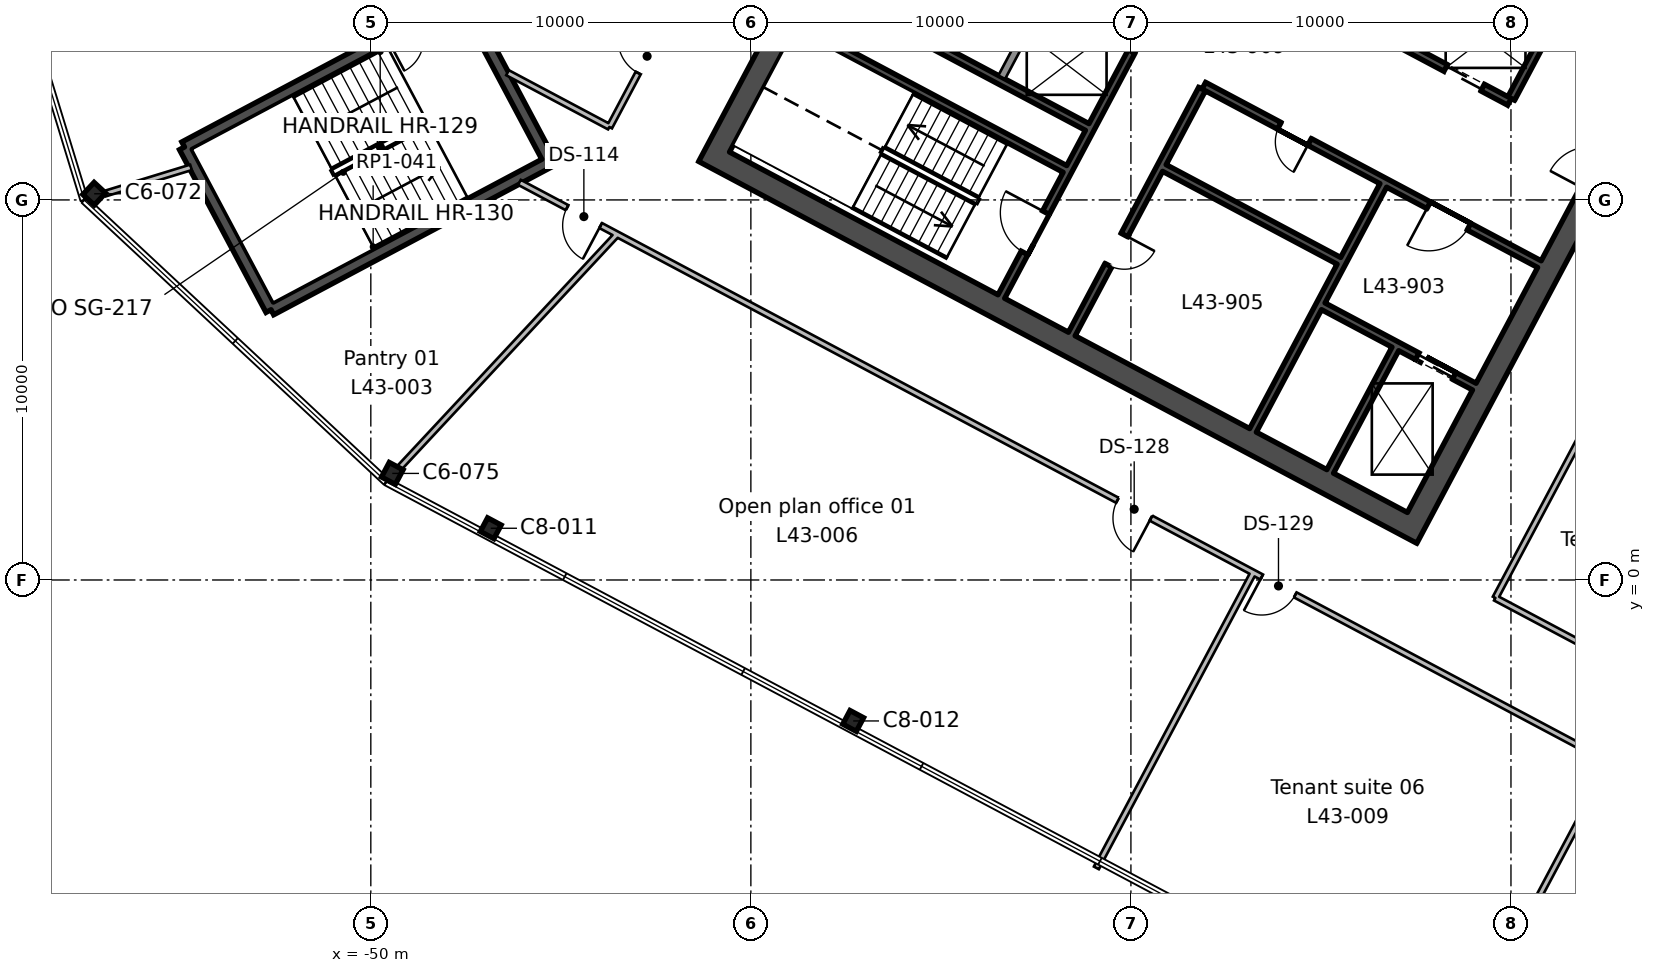
"""IFC4 building model, lengths in metres.
Left out: names, types, materials, properties, quantities, classifications, styles, units other than length and angle.
Written with IfcOpenShell. Run it as: python <this file> out.ifc"""

import sys

from ifc_helpers import new_model, si_unit, direction, frame, frame_2d, origin, origin_2d, place, context, subcontext, project, spatial, rectangle, i_section, extrude, element, fill, save


model = new_model("IFC4")
c1 = context("Model", 3, precision=1e-05, world=origin(), true_north=direction((0.0, 1.0)))
c2 = subcontext(c1, "Body", "Model", "MODEL_VIEW")
j1 = project(units=[si_unit("LENGTHUNIT", "METRE"), si_unit("PLANEANGLEUNIT", "RADIAN")], contexts=[c1])
p1 = place(None, origin())
s1 = spatial("IfcSite", under=j1, at=p1, CompositionType="ELEMENT")
p2 = place(p1, origin())
s2 = spatial("IfcBuilding", under=s1, at=p2, CompositionType="ELEMENT")
p3 = place(p2, frame((0.0, 0.0, 201.3)))
s3 = spatial("IfcBuildingStorey", under=s2, at=p3, CompositionType="ELEMENT", Elevation=201.3)
for number, where, z_axis, x_axis in (
    (1, (-37.308, -3.709, 0.0), (0.0, 0.0, 1.0), (0.883, -0.469, 0.0)),
    (2, (-46.844, 1.361, 0.0), (0.0, 0.0, 1.0), (0.883, -0.469, 0.0)),
):
    element("IfcColumn", number, at=place(p3, frame(where, z_axis=z_axis, x_axis=x_axis)), inside=s3, PredefinedType="COLUMN", context=c2, shape_type="SweptSolid", body=[
        extrude(i_section(OverallWidth=0.404, OverallDepth=0.406, WebThickness=0.027, FlangeThickness=0.044, FilletRadius=0.015, at=origin_2d()), origin(), (0.0, 0.0, 1.0), 3.9),
    ])
for number, where, z_axis, x_axis in (
    (3, (-49.435, 2.804, 0.0), (0.0, 0.0, 1.0), (0.883, -0.469, 0.0)),
    (4, (-57.279, 10.162, 0.0), (0.0, 0.0, 1.0), (0.731, -0.682, 0.0)),
):
    element("IfcColumn", number, at=place(p3, frame(where, z_axis=z_axis, x_axis=x_axis)), inside=s3, PredefinedType="COLUMN", context=c2, shape_type="SweptSolid", body=[
        extrude(i_section(OverallWidth=0.412, OverallDepth=0.434, WebThickness=0.036, FlangeThickness=0.057, FilletRadius=0.015, at=origin_2d()), origin(), (0.0, 0.0, 1.0), 3.9),
    ])
p4 = place(p3, frame((-13.635, 18.236, 0.0), z_axis=(0.0, 0.0, 1.0), x_axis=(-0.469478769487, -0.88294376095, 0.0)))
e5 = element("IfcWall", 5, at=p4, inside=s3, PredefinedType="SHEAR", context=c2, shape_type="SweptSolid", body=[
    extrude(rectangle(XDim=19.4, YDim=0.6, at=frame_2d((9.7, 0.0))), origin(), (0.0, 0.0, 1.0), 3.9),
])
p5 = place(p4, frame((6.7, 0.0, 0.0)))
e6 = element("IfcOpeningElement", 6, at=p5, cuts=e5, PredefinedType="OPENING", context=c2, shape_type="SweptSolid", body=[
    extrude(rectangle(XDim=2.4, YDim=2.4, at=frame_2d((1.2, 1.2))), frame((0.0, 0.31, 0.0), z_axis=(0.0, -1.0, 0.0), x_axis=(1.0, 0.0, 0.0)), (0.0, 0.0, 1.0), 0.62),
])
p6 = place(p3, frame((-32.0, 28.001, 0.0), z_axis=(0.0, 0.0, 1.0), x_axis=(-0.469468958625, -0.882948977511, 0.0)))
e7 = element("IfcWall", 7, at=p6, inside=s3, PredefinedType="SHEAR", context=c2, shape_type="SweptSolid", body=[
    extrude(rectangle(XDim=19.4, YDim=0.6, at=frame_2d((9.7, 0.0))), origin(), (0.0, 0.0, 1.0), 3.9),
])
p7 = place(p6, frame((10.3, 0.0, 0.0)))
e8 = element("IfcOpeningElement", 8, at=p7, cuts=e7, PredefinedType="OPENING", context=c2, shape_type="SweptSolid", body=[
    extrude(rectangle(XDim=2.4, YDim=2.4, at=frame_2d((1.2, 1.2))), frame((0.0, 0.31, 0.0), z_axis=(0.0, -1.0, 0.0), x_axis=(1.0, 0.0, 0.0)), (0.0, 0.0, 1.0), 0.62),
])
p8 = place(p3, frame((-22.867, 1.512, 0.0), z_axis=(0.0, 0.0, 1.0), x_axis=(-0.88294509198, 0.469476266226, 0.0)))
e9 = element("IfcWall", 9, at=p8, inside=s3, PredefinedType="SHEAR", context=c2, shape_type="SweptSolid", body=[
    extrude(rectangle(XDim=20.2, YDim=0.6, at=frame_2d((10.1, 0.0))), origin(), (0.0, 0.0, 1.0), 3.9),
])
p9 = place(p3, frame((-23.043, 6.08, 0.0), z_axis=(0.0, 0.0, 1.0), x_axis=(-0.469494272526, -0.882935517501, 0.0)))
e10 = element("IfcWall", 10, at=p9, inside=s3, PredefinedType="SHEAR", context=c2, shape_type="SweptSolid", body=[
    extrude(rectangle(XDim=3.65, YDim=0.2, at=frame_2d((1.825, 0.0))), origin(), (0.0, 0.0, 1.0), 3.9),
])
p10 = place(p3, frame((-18.96, 14.611, 0.0), z_axis=(0.0, 0.0, 1.0), x_axis=(-0.4694473164, -0.882960484464, 0.0)))
e11 = element("IfcWall", 11, at=p10, inside=s3, PredefinedType="SHEAR", context=c2, shape_type="SweptSolid", body=[
    extrude(rectangle(XDim=2.2, YDim=0.2, at=frame_2d((1.1, 0.0))), origin(), (0.0, 0.0, 1.0), 3.9),
])
p11 = place(p3, frame((-23.36, 10.382, 0.0), z_axis=(0.0, 0.0, 1.0), x_axis=(-0.469480409012, -0.88294288918, 0.0)))
e12 = element("IfcWall", 12, at=p11, inside=s3, PredefinedType="SHEAR", context=c2, shape_type="SweptSolid", body=[
    extrude(rectangle(XDim=7.3, YDim=0.2, at=frame_2d((3.65, 0.0))), origin(), (0.0, 0.0, 1.0), 3.9),
])
p12 = place(p3, frame((-28.128, 12.917, 0.0), z_axis=(0.0, 0.0, 1.0), x_axis=(-0.469454336211, -0.882956752176, 0.0)))
e13 = element("IfcWall", 13, at=p12, inside=s3, PredefinedType="SHEAR", context=c2, shape_type="SweptSolid", body=[
    extrude(rectangle(XDim=7.3, YDim=0.2, at=frame_2d((3.65, 0.0))), origin(), (0.0, 0.0, 1.0), 3.9),
])
p13 = place(p12, frame((4.35, 0.0, 0.0)))
e14 = element("IfcOpeningElement", 14, at=p13, cuts=e13, PredefinedType="OPENING", context=c2, shape_type="SweptSolid", body=[
    extrude(rectangle(XDim=0.9, YDim=2.1, at=frame_2d((0.45, 1.05))), frame((0.0, 0.11, 0.0), z_axis=(0.0, -1.0, 0.0), x_axis=(1.0, 0.0, 0.0)), (0.0, 0.0, 1.0), 0.22),
])
p14 = place(p3, frame((-29.982, 13.903, 0.0), z_axis=(0.0, 0.0, 1.0), x_axis=(-0.469454336211, -0.882956752176, 0.0)))
e15 = element("IfcWall", 15, at=p14, inside=s3, PredefinedType="SHEAR", context=c2, shape_type="SweptSolid", body=[
    extrude(rectangle(XDim=7.3, YDim=0.2, at=frame_2d((3.65, 0.0))), origin(), (0.0, 0.0, 1.0), 3.9),
])
p15 = place(p14, frame((4.8, 0.0, 0.0)))
e16 = element("IfcOpeningElement", 16, at=p15, cuts=e15, PredefinedType="OPENING", context=c2, shape_type="SweptSolid", body=[
    extrude(rectangle(XDim=1.2, YDim=2.1, at=frame_2d((0.6, 1.05))), frame((0.0, 0.11, 0.0), z_axis=(0.0, -1.0, 0.0), x_axis=(1.0, 0.0, 0.0)), (0.0, 0.0, 1.0), 0.22),
])
p16 = place(p3, frame((-32.366, 15.171, 0.0), z_axis=(0.0, 0.0, 1.0), x_axis=(-0.469487830541, -0.882938942948, 0.0)))
e17 = element("IfcWall", 17, at=p16, inside=s3, PredefinedType="SOLIDWALL", context=c2, shape_type="SweptSolid", body=[
    extrude(rectangle(XDim=2.2, YDim=0.2, at=frame_2d((1.1, 0.0))), origin(), (0.0, 0.0, 1.0), 3.9),
])
p17 = place(p3, frame((-16.529, 13.432, 0.0), z_axis=(0.0, 0.0, 1.0), x_axis=(-0.88295287151, 0.469461634952, 0.0)))
e18 = element("IfcWall", 18, at=p17, inside=s3, PredefinedType="SHEAR", context=c2, shape_type="SweptSolid", body=[
    extrude(rectangle(XDim=8.0, YDim=0.2, at=frame_2d((4.0, 0.0))), origin(), (0.0, 0.0, 1.0), 3.9),
])
p18 = place(p3, frame((-20.04, 12.581, 0.0), z_axis=(0.0, 0.0, 1.0), x_axis=(-0.882942972946, 0.469480251476, 0.0)))
e19 = element("IfcWall", 19, at=p18, inside=s3, PredefinedType="SHEAR", context=c2, shape_type="SweptSolid", body=[
    extrude(rectangle(XDim=5.4, YDim=0.2, at=frame_2d((2.7, 0.0))), origin(), (0.0, 0.0, 1.0), 3.9),
])
p19 = place(p18, frame((0.8, 0.0, 0.0)))
e20 = element("IfcOpeningElement", 20, at=p19, cuts=e19, PredefinedType="OPENING", context=c2, shape_type="SweptSolid", body=[
    extrude(rectangle(XDim=1.1, YDim=2.1, at=frame_2d((0.55, 1.05))), frame((0.0, 0.11, 0.0), z_axis=(0.0, -1.0, 0.0), x_axis=(1.0, 0.0, 0.0)), (0.0, 0.0, 1.0), 0.22),
])
p20 = place(p18, frame((3.5, 0.0, 0.0)))
e21 = element("IfcOpeningElement", 21, at=p20, cuts=e19, PredefinedType="OPENING", context=c2, shape_type="SweptSolid", body=[
    extrude(rectangle(XDim=1.1, YDim=2.1, at=frame_2d((0.55, 1.05))), frame((0.0, 0.11, 0.0), z_axis=(0.0, -1.0, 0.0), x_axis=(1.0, 0.0, 0.0)), (0.0, 0.0, 1.0), 0.22),
])
p21 = place(p3, frame((-19.252, 8.311, 0.0), z_axis=(0.0, 0.0, 1.0), x_axis=(-0.882955722218, 0.469456273365, 0.0)))
e22 = element("IfcWall", 22, at=p21, inside=s3, PredefinedType="SHEAR", context=c2, shape_type="SweptSolid", body=[
    extrude(rectangle(XDim=10.0, YDim=0.2, at=frame_2d((5.0, 0.0))), origin(), (0.0, 0.0, 1.0), 3.9),
])
p22 = place(p21, frame((2.1, 0.0, 0.0)))
e23 = element("IfcOpeningElement", 23, at=p22, cuts=e22, PredefinedType="OPENING", context=c2, shape_type="SweptSolid", body=[
    extrude(rectangle(XDim=1.2, YDim=2.1, at=frame_2d((0.6, 1.05))), frame((0.0, 0.11, 0.0), z_axis=(0.0, -1.0, 0.0), x_axis=(1.0, 0.0, 0.0)), (0.0, 0.0, 1.0), 0.22),
])
p23 = place(p21, frame((6.85, 0.0, 0.0)))
e24 = element("IfcOpeningElement", 24, at=p23, cuts=e22, PredefinedType="OPENING", context=c2, shape_type="SweptSolid", body=[
    extrude(rectangle(XDim=0.9, YDim=2.1, at=frame_2d((0.45, 1.05))), frame((0.0, 0.11, 0.0), z_axis=(0.0, -1.0, 0.0), x_axis=(1.0, 0.0, 0.0)), (0.0, 0.0, 1.0), 0.22),
])
p24 = place(p3, frame((-24.528, 8.398, 0.0), z_axis=(0.0, 0.0, 1.0), x_axis=(-0.882953967957, 0.469459572775, 0.0)))
e25 = element("IfcWall", 25, at=p24, inside=s3, PredefinedType="SHEAR", context=c2, shape_type="SweptSolid", body=[
    extrude(rectangle(XDim=5.2, YDim=0.2, at=frame_2d((2.6, 0.0))), origin(), (0.0, 0.0, 1.0), 3.9),
])
p25 = place(p3, frame((-31.15, 11.919, 0.0), z_axis=(0.0, 0.0, 1.0), x_axis=(-0.882940221191, 0.469485426614, 0.0)))
e26 = element("IfcWall", 26, at=p25, inside=s3, PredefinedType="SHEAR", context=c2, shape_type="SweptSolid", body=[
    extrude(rectangle(XDim=8.0, YDim=0.2, at=frame_2d((4.0, 0.0))), origin(), (0.0, 0.0, 1.0), 3.9),
])
p26 = place(p3, frame((-20.965, 5.088, 0.0), z_axis=(0.0, 0.0, 1.0), x_axis=(-0.882925986334, 0.469512196493, 0.0)))
e27 = element("IfcWall", 27, at=p26, inside=s3, PredefinedType="SHEAR", context=c2, shape_type="SweptSolid", body=[
    extrude(rectangle(XDim=4.5, YDim=0.2, at=frame_2d((2.25, 0.0))), origin(), (0.0, 0.0, 1.0), 3.9),
])
p27 = place(p26, frame((0.6, 0.0, 0.0)))
e28 = element("IfcOpeningElement", 28, at=p27, cuts=e27, PredefinedType="OPENING", context=c2, shape_type="SweptSolid", body=[
    extrude(rectangle(XDim=1.1, YDim=2.1, at=frame_2d((0.55, 1.05))), frame((0.0, 0.11, 0.0), z_axis=(0.0, -1.0, 0.0), x_axis=(1.0, 0.0, 0.0)), (0.0, 0.0, 1.0), 0.22),
])
p28 = place(p3, frame((-31.737, 10.816, 0.0), z_axis=(0.0, 0.0, 1.0), x_axis=(-0.882940221191, 0.469485426614, 0.0)))
e29 = element("IfcWall", 29, at=p28, inside=s3, PredefinedType="SHEAR", context=c2, shape_type="SweptSolid", body=[
    extrude(rectangle(XDim=8.0, YDim=0.2, at=frame_2d((4.0, 0.0))), origin(), (0.0, 0.0, 1.0), 3.9),
])
p29 = place(p3, frame((-47.574, 15.29, 0.0), z_axis=(0.0, 0.0, 1.0), x_axis=(0.469443498566, -0.882962514297, 0.0)))
e30 = element("IfcWall", 30, at=p29, inside=s3, PredefinedType="SHEAR", context=c2, shape_type="SweptSolid", body=[
    extrude(rectangle(XDim=4.85, YDim=0.3, at=frame_2d((2.425, 0.0))), origin(), (0.0, 0.0, 1.0), 3.9),
])
p30 = place(p3, frame((-45.297, 11.007, 0.0), z_axis=(0.0, 0.0, 1.0), x_axis=(-0.882951519127, -0.469464178475, 0.0)))
e31 = element("IfcWall", 31, at=p30, inside=s3, PredefinedType="SHEAR", context=c2, shape_type="SweptSolid", body=[
    extrude(rectangle(XDim=8.3, YDim=0.3, at=frame_2d((4.15, 0.0))), origin(), (0.0, 0.0, 1.0), 3.9),
])
p31 = place(p3, frame((-52.626, 7.111, 0.0), z_axis=(0.0, 0.0, 1.0), x_axis=(-0.469464364128, 0.882951420416, 0.0)))
e32 = element("IfcWall", 32, at=p31, inside=s3, PredefinedType="SHEAR", context=c2, shape_type="SweptSolid", body=[
    extrude(rectangle(XDim=4.85, YDim=0.3, at=frame_2d((2.425, 0.0))), origin(), (0.0, 0.0, 1.0), 3.9),
])
p32 = place(p3, frame((-54.903, 11.393, 0.0), z_axis=(0.0, 0.0, 1.0), x_axis=(0.882939326045, 0.469487110071, 0.0)))
e33 = element("IfcWall", 33, at=p32, inside=s3, PredefinedType="SHEAR", context=c2, shape_type="SweptSolid", body=[
    extrude(rectangle(XDim=8.3, YDim=0.3, at=frame_2d((4.15, 0.0))), origin(), (0.0, 0.0, 1.0), 3.9),
])
p33 = place(p32, frame((6.05, 0.0, 0.0)))
e34 = element("IfcOpeningElement", 34, at=p33, cuts=e33, PredefinedType="OPENING", context=c2, shape_type="SweptSolid", body=[
    extrude(rectangle(XDim=1.9, YDim=2.1, at=frame_2d((0.95, 1.05))), frame((0.0, 0.16, 0.0), z_axis=(0.0, -1.0, 0.0), x_axis=(1.0, 0.0, 0.0)), (0.0, 0.0, 1.0), 0.32),
])
p34 = place(p3, frame((-54.732, 10.857, 0.0), z_axis=(0.0, 0.0, 1.0), x_axis=(-0.956308315689, -0.292360061129, 0.0)))
e35 = element("IfcWall", 35, at=p34, inside=s3, PredefinedType="PARTITIONING", context=c2, shape_type="SweptSolid", body=[
    extrude(rectangle(XDim=2.367, YDim=0.15, at=frame_2d((1.183, 0.0))), origin(), (0.0, 0.0, 1.0), 3.54),
])
p35 = place(p3, frame((-43.519, 9.096, 0.0), z_axis=(0.0, 0.0, 1.0), x_axis=(-0.681976527411, -0.731374060287, 0.0)))
e36 = element("IfcWall", 36, at=p35, inside=s3, PredefinedType="PARTITIONING", context=c2, shape_type="SweptSolid", body=[
    extrude(rectangle(XDim=8.402, YDim=0.15, at=frame_2d((4.201, 0.0))), origin(), (0.0, 0.0, 1.0), 3.54),
])
p36 = place(p3, frame((-26.777, 0.194, 0.0), z_axis=(0.0, 0.0, 1.0), x_axis=(-0.469510830369, -0.882926712794, 0.0)))
e37 = element("IfcWall", 37, at=p36, inside=s3, PredefinedType="PARTITIONING", context=c2, shape_type="SweptSolid", body=[
    extrude(rectangle(XDim=8.8, YDim=0.15, at=frame_2d((4.4, 0.0))), origin(), (0.0, 0.0, 1.0), 3.54),
])
p37 = place(p3, frame((-46.403, 13.347, 0.0), z_axis=(0.0, 0.0, 1.0), x_axis=(0.882959580004, -0.46944901755, 0.0)))
e38 = element("IfcWall", 38, at=p37, inside=s3, PredefinedType="PARTITIONING", context=c2, shape_type="SweptSolid", body=[
    extrude(rectangle(XDim=3.038, YDim=0.15, at=frame_2d((1.519, 0.0))), origin(), (0.0, 0.0, 1.0), 3.54),
])
p38 = place(p3, frame((-41.769, 15.592, 0.0), z_axis=(0.0, 0.0, 1.0), x_axis=(-0.468884925056, -0.883259263781, 0.0)))
e39 = element("IfcWall", 39, at=p38, inside=s3, PredefinedType="PARTITIONING", context=c2, shape_type="SweptSolid", body=[
    extrude(rectangle(XDim=4.161, YDim=0.15, at=frame_2d((2.081, 0.0))), origin(), (0.0, 0.0, 1.0), 3.54),
])
p39 = place(p38, frame((1.55, 0.0, 0.0)))
e40 = element("IfcOpeningElement", 40, at=p39, cuts=e39, PredefinedType="OPENING", context=c2, shape_type="SweptSolid", body=[
    extrude(rectangle(XDim=1.0, YDim=2.1, at=frame_2d((0.5, 1.05))), frame((0.0, 0.085, 0.0), z_axis=(0.0, -1.0, 0.0), x_axis=(1.0, 0.0, 0.0)), (0.0, 0.0, 1.0), 0.17),
])
p40 = place(p3, frame((-13.8, -6.706, 0.0), z_axis=(0.0, 0.0, 1.0), x_axis=(-0.882947286887, 0.469472138235, 0.0)))
e41 = element("IfcWall", 41, at=p40, inside=s3, PredefinedType="PARTITIONING", context=c2, shape_type="SweptSolid", body=[
    extrude(rectangle(XDim=36.571, YDim=0.15, at=frame_2d((18.285, 0.0))), origin(), (0.0, 0.0, 1.0), 3.54),
])
p41 = place(p40, frame((34.15, 0.0, 0.0)))
e42 = element("IfcOpeningElement", 42, at=p41, cuts=e41, PredefinedType="OPENING", context=c2, shape_type="SweptSolid", body=[
    extrude(rectangle(XDim=1.0, YDim=2.1, at=frame_2d((0.5, 1.05))), frame((0.0, 0.085, 0.0), z_axis=(0.0, -1.0, 0.0), x_axis=(1.0, 0.0, 0.0)), (0.0, 0.0, 1.0), 0.17),
])
p42 = place(p40, frame((17.75, 0.0, 0.0)))
e43 = element("IfcOpeningElement", 43, at=p42, cuts=e41, PredefinedType="OPENING", context=c2, shape_type="SweptSolid", body=[
    extrude(rectangle(XDim=1.0, YDim=2.1, at=frame_2d((0.5, 1.05))), frame((0.0, 0.085, 0.0), z_axis=(0.0, -1.0, 0.0), x_axis=(1.0, 0.0, 0.0)), (0.0, 0.0, 1.0), 0.17),
])
p43 = place(p40, frame((13.45, 0.0, 0.0)))
e44 = element("IfcOpeningElement", 44, at=p43, cuts=e41, PredefinedType="OPENING", context=c2, shape_type="SweptSolid", body=[
    extrude(rectangle(XDim=1.0, YDim=2.1, at=frame_2d((0.5, 1.05))), frame((0.0, 0.085, 0.0), z_axis=(0.0, -1.0, 0.0), x_axis=(1.0, 0.0, 0.0)), (0.0, 0.0, 1.0), 0.17),
])
p44 = place(p40, frame((2.85, 0.0, 0.0)))
e45 = element("IfcOpeningElement", 45, at=p44, cuts=e41, PredefinedType="OPENING", context=c2, shape_type="SweptSolid", body=[
    extrude(rectangle(XDim=1.0, YDim=2.1, at=frame_2d((0.5, 1.05))), frame((0.0, 0.085, 0.0), z_axis=(0.0, -1.0, 0.0), x_axis=(1.0, 0.0, 0.0)), (0.0, 0.0, 1.0), 0.17),
])
p45 = place(p3, frame((-17.388, -4.798, 0.0), z_axis=(0.0, 0.0, 1.0), x_axis=(-0.469532456729, -0.882915212281, 0.0)))
e46 = element("IfcWall", 46, at=p45, inside=s3, PredefinedType="PARTITIONING", context=c2, shape_type="SweptSolid", body=[
    extrude(rectangle(XDim=8.8, YDim=0.15, at=frame_2d((4.4, 0.0))), origin(), (0.0, 0.0, 1.0), 3.54),
])
p46 = place(p3, frame((-20.411, -0.473, 0.0), z_axis=(0.0, 0.0, 1.0), x_axis=(0.469451816494, 0.882958091865, 0.0)))
e47 = element("IfcWall", 47, at=p46, inside=s3, PredefinedType="PARTITIONING", context=c2, shape_type="SweptSolid", body=[
    extrude(rectangle(XDim=20.0, YDim=0.15, at=frame_2d((10.0, 0.0))), origin(), (0.0, 0.0, 1.0), 3.54),
])
p47 = place(p46, frame((9.45, 0.0, 0.0)))
e48 = element("IfcOpeningElement", 48, at=p47, cuts=e47, PredefinedType="OPENING", context=c2, shape_type="SweptSolid", body=[
    extrude(rectangle(XDim=1.0, YDim=2.1, at=frame_2d((0.5, 1.05))), frame((0.0, 0.085, 0.0), z_axis=(0.0, -1.0, 0.0), x_axis=(1.0, 0.0, 0.0)), (0.0, 0.0, 1.0), 0.17),
])
p48 = place(p3, frame((-13.8, -3.988, 0.0), z_axis=(0.0, 0.0, 1.0), x_axis=(-0.88294256459, 0.469481019461, 0.0)))
e49 = element("IfcWall", 49, at=p48, inside=s3, PredefinedType="PARTITIONING", context=c2, shape_type="SweptSolid", body=[
    extrude(rectangle(XDim=7.487, YDim=0.15, at=frame_2d((3.744, 0.0))), origin(), (0.0, 0.0, 1.0), 3.54),
])
p49 = place(p22, origin())
e50 = element("IfcDoor", 50, at=p49, inside=s3, OperationType="SINGLE_SWING_RIGHT", PredefinedType="DOOR", context=c2, shape_type="SweptSolid", body=[
    extrude(rectangle(XDim=1.2, YDim=2.1, at=frame_2d((0.6, 1.05))), frame((0.0, 0.025, 0.0), z_axis=(0.0, -1.0, 0.0), x_axis=(1.0, 0.0, 0.0)), (0.0, 0.0, 1.0), 0.05),
])
fill(e23, e50)
p50 = place(p15, frame((1.2, 0.0, 0.0), z_axis=(0.0, 0.0, 1.0), x_axis=(-1.0, 0.0, 0.0)))
e51 = element("IfcDoor", 51, at=p50, inside=s3, OperationType="SINGLE_SWING_RIGHT", PredefinedType="DOOR", context=c2, shape_type="SweptSolid", body=[
    extrude(rectangle(XDim=1.2, YDim=2.1, at=frame_2d((0.6, 1.05))), frame((0.0, 0.025, 0.0), z_axis=(0.0, -1.0, 0.0), x_axis=(1.0, 0.0, 0.0)), (0.0, 0.0, 1.0), 0.05),
])
fill(e16, e51)
p51 = place(p23, origin())
e52 = element("IfcDoor", 52, at=p51, inside=s3, OperationType="SINGLE_SWING_LEFT", PredefinedType="DOOR", context=c2, shape_type="SweptSolid", body=[
    extrude(rectangle(XDim=0.9, YDim=2.1, at=frame_2d((0.45, 1.05))), frame((0.0, 0.025, 0.0), z_axis=(0.0, -1.0, 0.0), x_axis=(1.0, 0.0, 0.0)), (0.0, 0.0, 1.0), 0.05),
])
fill(e24, e52)
p52 = place(p19, origin())
e53 = element("IfcDoor", 53, at=p52, inside=s3, OperationType="DOUBLE_DOOR_SLIDING", PredefinedType="DOOR", context=c2, shape_type="SweptSolid", body=[
    extrude(rectangle(XDim=1.1, YDim=2.1, at=frame_2d((0.55, 1.05))), frame((0.0, 0.025, 0.0), z_axis=(0.0, -1.0, 0.0), x_axis=(1.0, 0.0, 0.0)), (0.0, 0.0, 1.0), 0.05),
])
fill(e20, e53)
p53 = place(p27, origin())
e54 = element("IfcDoor", 54, at=p53, inside=s3, OperationType="DOUBLE_DOOR_SLIDING", PredefinedType="DOOR", context=c2, shape_type="SweptSolid", body=[
    extrude(rectangle(XDim=1.1, YDim=2.1, at=frame_2d((0.55, 1.05))), frame((0.0, 0.025, 0.0), z_axis=(0.0, -1.0, 0.0), x_axis=(1.0, 0.0, 0.0)), (0.0, 0.0, 1.0), 0.05),
])
fill(e28, e54)
p54 = place(p13, origin())
e55 = element("IfcDoor", 55, at=p54, inside=s3, OperationType="SINGLE_SWING_LEFT", PredefinedType="DOOR", context=c2, shape_type="SweptSolid", body=[
    extrude(rectangle(XDim=0.9, YDim=2.1, at=frame_2d((0.45, 1.05))), frame((0.0, 0.025, 0.0), z_axis=(0.0, -1.0, 0.0), x_axis=(1.0, 0.0, 0.0)), (0.0, 0.0, 1.0), 0.05),
])
fill(e14, e55)
p55 = place(p39, frame((1.0, 0.0, 0.0), z_axis=(0.0, 0.0, 1.0), x_axis=(-1.0, 0.0, 0.0)))
e56 = element("IfcDoor", 56, at=p55, inside=s3, OperationType="SINGLE_SWING_RIGHT", PredefinedType="DOOR", context=c2, shape_type="SweptSolid", body=[
    extrude(rectangle(XDim=1.0, YDim=2.1, at=frame_2d((0.5, 1.05))), frame((0.0, 0.025, 0.0), z_axis=(0.0, -1.0, 0.0), x_axis=(1.0, 0.0, 0.0)), (0.0, 0.0, 1.0), 0.05),
])
fill(e40, e56)
p56 = place(p41, origin())
e57 = element("IfcDoor", 57, at=p56, inside=s3, OperationType="SINGLE_SWING_LEFT", PredefinedType="DOOR", context=c2, shape_type="SweptSolid", body=[
    extrude(rectangle(XDim=1.0, YDim=2.1, at=frame_2d((0.5, 1.05))), frame((0.0, 0.025, 0.0), z_axis=(0.0, -1.0, 0.0), x_axis=(1.0, 0.0, 0.0)), (0.0, 0.0, 1.0), 0.05),
])
fill(e42, e57)
p57 = place(p42, origin())
e58 = element("IfcDoor", 58, at=p57, inside=s3, OperationType="SINGLE_SWING_LEFT", PredefinedType="DOOR", context=c2, shape_type="SweptSolid", body=[
    extrude(rectangle(XDim=1.0, YDim=2.1, at=frame_2d((0.5, 1.05))), frame((0.0, 0.025, 0.0), z_axis=(0.0, -1.0, 0.0), x_axis=(1.0, 0.0, 0.0)), (0.0, 0.0, 1.0), 0.05),
])
fill(e43, e58)
p58 = place(p43, origin())
e59 = element("IfcDoor", 59, at=p58, inside=s3, OperationType="SINGLE_SWING_RIGHT", PredefinedType="DOOR", context=c2, shape_type="SweptSolid", body=[
    extrude(rectangle(XDim=1.0, YDim=2.1, at=frame_2d((0.5, 1.05))), frame((0.0, 0.025, 0.0), z_axis=(0.0, -1.0, 0.0), x_axis=(1.0, 0.0, 0.0)), (0.0, 0.0, 1.0), 0.05),
])
fill(e44, e59)
save(model, sys.argv[1])
